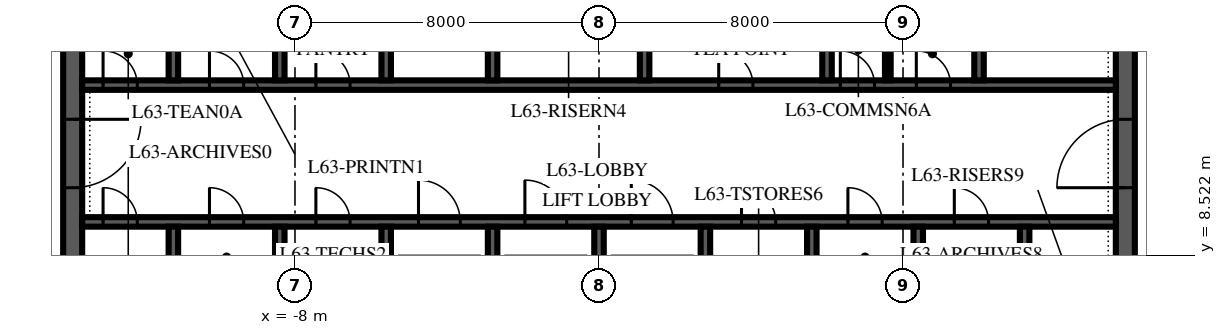
"""IFC4 building model, lengths in metres.
Left out: names, types, materials, properties, quantities, classifications, styles, units other than length and angle.
Written with IfcOpenShell. Run it as: python <this file> out.ifc"""

import sys

from ifc_helpers import new_model, si_unit, direction, frame, frame_2d, origin, place, context, subcontext, project, spatial, polyline, rectangle, outline, extrude, element, fill, save


model = new_model("IFC4")
c1 = context("Model", 3, precision=1e-05, world=origin(), true_north=direction((0.0, 1.0)))
c2 = subcontext(c1, "Body", "Model", "MODEL_VIEW")
j1 = project(units=[si_unit("LENGTHUNIT", "METRE"), si_unit("PLANEANGLEUNIT", "RADIAN")], contexts=[c1])
p1 = place(None, origin())
s1 = spatial("IfcSite", under=j1, at=p1, CompositionType="ELEMENT")
p2 = place(p1, origin())
s2 = spatial("IfcBuilding", under=s1, at=p2, CompositionType="ELEMENT")
p3 = place(p2, frame((0.0, 0.0, 272.0)))
s3 = spatial("IfcBuildingStorey", under=s2, at=p3, CompositionType="ELEMENT", Elevation=272.0)
p4 = place(p3, frame((13.85, 6.15, 0.0), z_axis=(0.0, 0.0, 1.0), x_axis=(0.0, 1.0, 0.0)))
e1 = element("IfcWall", 1, at=p4, inside=s3, PredefinedType="SHEAR", context=c2, shape_type="SweptSolid", body=[
    extrude(outline(polyline([(0.0, -0.25), (17.7, -0.25), (17.7, 0.0), (17.45, 0.0), (17.45, 0.25), (0.25, 0.25), (0.25, 0.0), (0.0, 0.0), (0.0, -0.25)])), origin(), (0.0, 0.0, 1.0), 4.0),
])
p5 = place(p4, frame((4.15, 0.0, 0.0)))
e2 = element("IfcOpeningElement", 2, at=p5, cuts=e1, PredefinedType="OPENING", context=c2, shape_type="SweptSolid", body=[
    extrude(rectangle(XDim=1.8, YDim=2.4, at=frame_2d((0.9, 1.2))), frame((0.0, 0.265, 0.0), z_axis=(0.0, -1.0, 0.0), x_axis=(1.0, 0.0, 0.0)), (0.0, 0.0, 1.0), 0.53),
])
p6 = place(p3, frame((-13.85, 23.85, 0.0), z_axis=(0.0, 0.0, 1.0), x_axis=(0.0, -1.0, 0.0)))
e3 = element("IfcWall", 3, at=p6, inside=s3, PredefinedType="SHEAR", context=c2, shape_type="SweptSolid", body=[
    extrude(outline(polyline([(0.0, -0.25), (17.7, -0.25), (17.7, 0.0), (17.45, 0.0), (17.45, 0.25), (0.25, 0.25), (0.25, 0.0), (0.0, 0.0), (0.0, -0.25)])), origin(), (0.0, 0.0, 1.0), 4.0),
])
p7 = place(p6, frame((11.75, 0.0, 0.0)))
e4 = element("IfcOpeningElement", 4, at=p7, cuts=e3, PredefinedType="OPENING", context=c2, shape_type="SweptSolid", body=[
    extrude(rectangle(XDim=1.8, YDim=2.4, at=frame_2d((0.9, 1.2))), frame((0.0, 0.265, 0.0), z_axis=(0.0, -1.0, 0.0), x_axis=(1.0, 0.0, 0.0)), (0.0, 0.0, 1.0), 0.53),
])
p8 = place(p3, frame((-13.6, 9.4, 0.0), z_axis=(0.0, 0.0, 1.0), x_axis=(1.0, 0.0, 0.0)))
e5 = element("IfcWall", 5, at=p8, inside=s3, PredefinedType="SHEAR", context=c2, shape_type="SweptSolid", body=[
    extrude(rectangle(XDim=27.2, YDim=0.25, at=frame_2d((13.6, 0.0))), origin(), (0.0, 0.0, 1.0), 4.0),
])
p9 = place(p8, frame((8.85, 0.0, 0.0)))
e6 = element("IfcOpeningElement", 6, at=p9, cuts=e5, PredefinedType="OPENING", context=c2, shape_type="SweptSolid", body=[
    extrude(rectangle(XDim=1.1, YDim=2.1, at=frame_2d((0.55, 1.05))), frame((0.0, 0.14, 0.0), z_axis=(0.0, -1.0, 0.0), x_axis=(1.0, 0.0, 0.0)), (0.0, 0.0, 1.0), 0.28),
])
p10 = place(p8, frame((11.65, 0.0, 0.0)))
e7 = element("IfcOpeningElement", 7, at=p10, cuts=e5, PredefinedType="OPENING", context=c2, shape_type="SweptSolid", body=[
    extrude(rectangle(XDim=1.1, YDim=2.1, at=frame_2d((0.55, 1.05))), frame((0.0, 0.14, 0.0), z_axis=(0.0, -1.0, 0.0), x_axis=(1.0, 0.0, 0.0)), (0.0, 0.0, 1.0), 0.28),
])
p11 = place(p8, frame((14.45, 0.0, 0.0)))
e8 = element("IfcOpeningElement", 8, at=p11, cuts=e5, PredefinedType="OPENING", context=c2, shape_type="SweptSolid", body=[
    extrude(rectangle(XDim=1.1, YDim=2.1, at=frame_2d((0.55, 1.05))), frame((0.0, 0.14, 0.0), z_axis=(0.0, -1.0, 0.0), x_axis=(1.0, 0.0, 0.0)), (0.0, 0.0, 1.0), 0.28),
])
p12 = place(p8, frame((0.55, 0.0, 0.0)))
e9 = element("IfcOpeningElement", 9, at=p12, cuts=e5, PredefinedType="OPENING", context=c2, shape_type="SweptSolid", body=[
    extrude(rectangle(XDim=0.9, YDim=2.1, at=frame_2d((0.45, 1.05))), frame((0.0, 0.14, 0.0), z_axis=(0.0, -1.0, 0.0), x_axis=(1.0, 0.0, 0.0)), (0.0, 0.0, 1.0), 0.28),
])
p13 = place(p8, frame((3.35, 0.0, 0.0)))
e10 = element("IfcOpeningElement", 10, at=p13, cuts=e5, PredefinedType="OPENING", context=c2, shape_type="SweptSolid", body=[
    extrude(rectangle(XDim=0.9, YDim=2.1, at=frame_2d((0.45, 1.05))), frame((0.0, 0.14, 0.0), z_axis=(0.0, -1.0, 0.0), x_axis=(1.0, 0.0, 0.0)), (0.0, 0.0, 1.0), 0.28),
])
p14 = place(p8, frame((6.15, 0.0, 0.0)))
e11 = element("IfcOpeningElement", 11, at=p14, cuts=e5, PredefinedType="OPENING", context=c2, shape_type="SweptSolid", body=[
    extrude(rectangle(XDim=0.9, YDim=2.1, at=frame_2d((0.45, 1.05))), frame((0.0, 0.14, 0.0), z_axis=(0.0, -1.0, 0.0), x_axis=(1.0, 0.0, 0.0)), (0.0, 0.0, 1.0), 0.28),
])
p15 = place(p8, frame((17.35, 0.0, 0.0)))
e12 = element("IfcOpeningElement", 12, at=p15, cuts=e5, PredefinedType="OPENING", context=c2, shape_type="SweptSolid", body=[
    extrude(rectangle(XDim=0.9, YDim=2.1, at=frame_2d((0.45, 1.05))), frame((0.0, 0.14, 0.0), z_axis=(0.0, -1.0, 0.0), x_axis=(1.0, 0.0, 0.0)), (0.0, 0.0, 1.0), 0.28),
])
p16 = place(p8, frame((20.15, 0.0, 0.0)))
e13 = element("IfcOpeningElement", 13, at=p16, cuts=e5, PredefinedType="OPENING", context=c2, shape_type="SweptSolid", body=[
    extrude(rectangle(XDim=0.9, YDim=2.1, at=frame_2d((0.45, 1.05))), frame((0.0, 0.14, 0.0), z_axis=(0.0, -1.0, 0.0), x_axis=(1.0, 0.0, 0.0)), (0.0, 0.0, 1.0), 0.28),
])
p17 = place(p8, frame((22.95, 0.0, 0.0)))
e14 = element("IfcOpeningElement", 14, at=p17, cuts=e5, PredefinedType="OPENING", context=c2, shape_type="SweptSolid", body=[
    extrude(rectangle(XDim=0.9, YDim=2.1, at=frame_2d((0.45, 1.05))), frame((0.0, 0.14, 0.0), z_axis=(0.0, -1.0, 0.0), x_axis=(1.0, 0.0, 0.0)), (0.0, 0.0, 1.0), 0.28),
])
p18 = place(p3, frame((-13.6, 13.0, 0.0), z_axis=(0.0, 0.0, 1.0), x_axis=(1.0, 0.0, 0.0)))
e15 = element("IfcWall", 15, at=p18, inside=s3, PredefinedType="SHEAR", context=c2, shape_type="SweptSolid", body=[
    extrude(rectangle(XDim=27.2, YDim=0.25, at=frame_2d((13.6, 0.0))), origin(), (0.0, 0.0, 1.0), 4.0),
])
p19 = place(p18, frame((16.75, 0.0, 0.0)))
e16 = element("IfcOpeningElement", 16, at=p19, cuts=e15, PredefinedType="OPENING", context=c2, shape_type="SweptSolid", body=[
    extrude(rectangle(XDim=0.9, YDim=2.1, at=frame_2d((0.45, 1.05))), frame((0.0, 0.14, 0.0), z_axis=(0.0, -1.0, 0.0), x_axis=(1.0, 0.0, 0.0)), (0.0, 0.0, 1.0), 0.28),
])
p20 = place(p18, frame((19.95, 0.0, 0.0)))
e17 = element("IfcOpeningElement", 17, at=p20, cuts=e15, PredefinedType="OPENING", context=c2, shape_type="SweptSolid", body=[
    extrude(rectangle(XDim=0.9, YDim=2.1, at=frame_2d((0.45, 1.05))), frame((0.0, 0.14, 0.0), z_axis=(0.0, -1.0, 0.0), x_axis=(1.0, 0.0, 0.0)), (0.0, 0.0, 1.0), 0.28),
])
p21 = place(p18, frame((21.95, 0.0, 0.0)))
e18 = element("IfcOpeningElement", 18, at=p21, cuts=e15, PredefinedType="OPENING", context=c2, shape_type="SweptSolid", body=[
    extrude(rectangle(XDim=0.9, YDim=2.1, at=frame_2d((0.45, 1.05))), frame((0.0, 0.14, 0.0), z_axis=(0.0, -1.0, 0.0), x_axis=(1.0, 0.0, 0.0)), (0.0, 0.0, 1.0), 0.28),
])
p22 = place(p18, frame((0.55, 0.0, 0.0)))
e19 = element("IfcOpeningElement", 19, at=p22, cuts=e15, PredefinedType="OPENING", context=c2, shape_type="SweptSolid", body=[
    extrude(rectangle(XDim=0.9, YDim=2.1, at=frame_2d((0.45, 1.05))), frame((0.0, 0.14, 0.0), z_axis=(0.0, -1.0, 0.0), x_axis=(1.0, 0.0, 0.0)), (0.0, 0.0, 1.0), 0.28),
])
p23 = place(p18, frame((3.35, 0.0, 0.0)))
e20 = element("IfcOpeningElement", 20, at=p23, cuts=e15, PredefinedType="OPENING", context=c2, shape_type="SweptSolid", body=[
    extrude(rectangle(XDim=0.9, YDim=2.1, at=frame_2d((0.45, 1.05))), frame((0.0, 0.14, 0.0), z_axis=(0.0, -1.0, 0.0), x_axis=(1.0, 0.0, 0.0)), (0.0, 0.0, 1.0), 0.28),
])
p24 = place(p18, frame((6.15, 0.0, 0.0)))
e21 = element("IfcOpeningElement", 21, at=p24, cuts=e15, PredefinedType="OPENING", context=c2, shape_type="SweptSolid", body=[
    extrude(rectangle(XDim=0.9, YDim=2.1, at=frame_2d((0.45, 1.05))), frame((0.0, 0.14, 0.0), z_axis=(0.0, -1.0, 0.0), x_axis=(1.0, 0.0, 0.0)), (0.0, 0.0, 1.0), 0.28),
])
for number, where, z_axis, x_axis in (
    (22, (-11.2, 6.4, 0.0), (0.0, 0.0, 1.0), (0.0, 1.0, 0.0)),
    (23, (-8.4, 6.4, 0.0), (0.0, 0.0, 1.0), (0.0, 1.0, 0.0)),
    (24, (-5.6, 6.4, 0.0), (0.0, 0.0, 1.0), (0.0, 1.0, 0.0)),
    (25, (-2.8, 6.4, 0.0), (0.0, 0.0, 1.0), (0.0, 1.0, 0.0)),
    (26, (0.0, 6.4, 0.0), (0.0, 0.0, 1.0), (0.0, 1.0, 0.0)),
    (27, (2.8, 6.4, 0.0), (0.0, 0.0, 1.0), (0.0, 1.0, 0.0)),
    (28, (5.6, 6.4, 0.0), (0.0, 0.0, 1.0), (0.0, 1.0, 0.0)),
    (29, (8.4, 6.4, 0.0), (0.0, 0.0, 1.0), (0.0, 1.0, 0.0)),
    (30, (11.2, 6.4, 0.0), (0.0, 0.0, 1.0), (0.0, 1.0, 0.0)),
):
    element("IfcWall", number, at=place(p3, frame(where, z_axis=z_axis, x_axis=x_axis)), inside=s3, PredefinedType="SHEAR", context=c2, shape_type="SweptSolid", body=[
        extrude(rectangle(XDim=2.875, YDim=0.25, at=frame_2d((1.438, 0.0))), origin(), (0.0, 0.0, 1.0), 4.0),
    ])
for number, where, z_axis, x_axis in (
    (31, (-11.2, 13.125, 0.0), (0.0, 0.0, 1.0), (0.0, 1.0, 0.0)),
    (32, (-8.4, 13.125, 0.0), (0.0, 0.0, 1.0), (0.0, 1.0, 0.0)),
    (33, (-5.6, 13.125, 0.0), (0.0, 0.0, 1.0), (0.0, 1.0, 0.0)),
    (34, (-2.8, 13.125, 0.0), (0.0, 0.0, 1.0), (0.0, 1.0, 0.0)),
    (35, (1.2, 13.125, 0.0), (0.0, 0.0, 1.0), (0.0, 1.0, 0.0)),
    (36, (6.0, 13.125, 0.0), (0.0, 0.0, 1.0), (0.0, 1.0, 0.0)),
    (37, (10.0, 13.125, 0.0), (0.0, 0.0, 1.0), (0.0, 1.0, 0.0)),
):
    element("IfcWall", number, at=place(p3, frame(where, z_axis=z_axis, x_axis=x_axis)), inside=s3, PredefinedType="SHEAR", context=c2, shape_type="SweptSolid", body=[
        extrude(rectangle(XDim=2.75, YDim=0.25, at=frame_2d((1.375, 0.0))), origin(), (0.0, 0.0, 1.0), 4.0),
    ])
p25 = place(p3, frame((7.6, 13.125, 0.0), z_axis=(0.0, 0.0, 1.0), x_axis=(0.0, 1.0, 0.0)))
e38 = element("IfcWall", 38, at=p25, inside=s3, PredefinedType="PARTITIONING", context=c2, shape_type="SweptSolid", body=[
    extrude(rectangle(XDim=1.55, YDim=0.15, at=frame_2d((0.775, 0.0))), origin(), (0.0, 0.0, 1.0), 3.85),
])
p26 = place(p5, origin())
e39 = element("IfcDoor", 39, at=p26, inside=s3, OperationType="DOUBLE_DOOR_SINGLE_SWING", PredefinedType="DOOR", context=c2, shape_type="SweptSolid", body=[
    extrude(rectangle(XDim=1.8, YDim=2.4, at=frame_2d((0.9, 1.2))), frame((0.0, 0.25, 0.0), z_axis=(0.0, -1.0, 0.0), x_axis=(1.0, 0.0, 0.0)), (0.0, 0.0, 1.0), 0.5),
])
fill(e2, e39)
p27 = place(p7, origin())
e40 = element("IfcDoor", 40, at=p27, inside=s3, OperationType="DOUBLE_DOOR_SINGLE_SWING", PredefinedType="DOOR", context=c2, shape_type="SweptSolid", body=[
    extrude(rectangle(XDim=1.8, YDim=2.4, at=frame_2d((0.9, 1.2))), frame((0.0, 0.25, 0.0), z_axis=(0.0, -1.0, 0.0), x_axis=(1.0, 0.0, 0.0)), (0.0, 0.0, 1.0), 0.5),
])
fill(e4, e40)
p28 = place(p9, origin())
e41 = element("IfcDoor", 41, at=p28, inside=s3, OperationType="SLIDING_TO_LEFT", PredefinedType="DOOR", context=c2, shape_type="SweptSolid", body=[
    extrude(rectangle(XDim=1.1, YDim=2.1, at=frame_2d((0.55, 1.05))), frame((0.0, 0.125, 0.0), z_axis=(0.0, -1.0, 0.0), x_axis=(1.0, 0.0, 0.0)), (0.0, 0.0, 1.0), 0.25),
])
fill(e6, e41)
p29 = place(p10, origin())
e42 = element("IfcDoor", 42, at=p29, inside=s3, OperationType="SLIDING_TO_LEFT", PredefinedType="DOOR", context=c2, shape_type="SweptSolid", body=[
    extrude(rectangle(XDim=1.1, YDim=2.1, at=frame_2d((0.55, 1.05))), frame((0.0, 0.125, 0.0), z_axis=(0.0, -1.0, 0.0), x_axis=(1.0, 0.0, 0.0)), (0.0, 0.0, 1.0), 0.25),
])
fill(e7, e42)
p30 = place(p11, origin())
e43 = element("IfcDoor", 43, at=p30, inside=s3, OperationType="SLIDING_TO_LEFT", PredefinedType="DOOR", context=c2, shape_type="SweptSolid", body=[
    extrude(rectangle(XDim=1.1, YDim=2.1, at=frame_2d((0.55, 1.05))), frame((0.0, 0.125, 0.0), z_axis=(0.0, -1.0, 0.0), x_axis=(1.0, 0.0, 0.0)), (0.0, 0.0, 1.0), 0.25),
])
fill(e8, e43)
p31 = place(p19, origin())
e44 = element("IfcDoor", 44, at=p31, inside=s3, OperationType="SINGLE_SWING_LEFT", PredefinedType="DOOR", context=c2, shape_type="SweptSolid", body=[
    extrude(rectangle(XDim=0.9, YDim=2.1, at=frame_2d((0.45, 1.05))), frame((0.0, 0.125, 0.0), z_axis=(0.0, -1.0, 0.0), x_axis=(1.0, 0.0, 0.0)), (0.0, 0.0, 1.0), 0.25),
])
fill(e16, e44)
p32 = place(p20, origin())
e45 = element("IfcDoor", 45, at=p32, inside=s3, OperationType="SINGLE_SWING_LEFT", PredefinedType="DOOR", context=c2, shape_type="SweptSolid", body=[
    extrude(rectangle(XDim=0.9, YDim=2.1, at=frame_2d((0.45, 1.05))), frame((0.0, 0.125, 0.0), z_axis=(0.0, -1.0, 0.0), x_axis=(1.0, 0.0, 0.0)), (0.0, 0.0, 1.0), 0.25),
])
fill(e17, e45)
p33 = place(p21, origin())
e46 = element("IfcDoor", 46, at=p33, inside=s3, OperationType="SINGLE_SWING_LEFT", PredefinedType="DOOR", context=c2, shape_type="SweptSolid", body=[
    extrude(rectangle(XDim=0.9, YDim=2.1, at=frame_2d((0.45, 1.05))), frame((0.0, 0.125, 0.0), z_axis=(0.0, -1.0, 0.0), x_axis=(1.0, 0.0, 0.0)), (0.0, 0.0, 1.0), 0.25),
])
fill(e18, e46)
p34 = place(p22, origin())
e47 = element("IfcDoor", 47, at=p34, inside=s3, OperationType="SINGLE_SWING_LEFT", PredefinedType="DOOR", context=c2, shape_type="SweptSolid", body=[
    extrude(rectangle(XDim=0.9, YDim=2.1, at=frame_2d((0.45, 1.05))), frame((0.0, 0.125, 0.0), z_axis=(0.0, -1.0, 0.0), x_axis=(1.0, 0.0, 0.0)), (0.0, 0.0, 1.0), 0.25),
])
fill(e19, e47)
p35 = place(p23, origin())
e48 = element("IfcDoor", 48, at=p35, inside=s3, OperationType="SINGLE_SWING_LEFT", PredefinedType="DOOR", context=c2, shape_type="SweptSolid", body=[
    extrude(rectangle(XDim=0.9, YDim=2.1, at=frame_2d((0.45, 1.05))), frame((0.0, 0.125, 0.0), z_axis=(0.0, -1.0, 0.0), x_axis=(1.0, 0.0, 0.0)), (0.0, 0.0, 1.0), 0.25),
])
fill(e20, e48)
p36 = place(p24, origin())
e49 = element("IfcDoor", 49, at=p36, inside=s3, OperationType="SINGLE_SWING_LEFT", PredefinedType="DOOR", context=c2, shape_type="SweptSolid", body=[
    extrude(rectangle(XDim=0.9, YDim=2.1, at=frame_2d((0.45, 1.05))), frame((0.0, 0.125, 0.0), z_axis=(0.0, -1.0, 0.0), x_axis=(1.0, 0.0, 0.0)), (0.0, 0.0, 1.0), 0.25),
])
fill(e21, e49)
p37 = place(p12, origin())
e50 = element("IfcDoor", 50, at=p37, inside=s3, OperationType="SINGLE_SWING_LEFT", PredefinedType="DOOR", context=c2, shape_type="SweptSolid", body=[
    extrude(rectangle(XDim=0.9, YDim=2.1, at=frame_2d((0.45, 1.05))), frame((0.0, 0.125, 0.0), z_axis=(0.0, -1.0, 0.0), x_axis=(1.0, 0.0, 0.0)), (0.0, 0.0, 1.0), 0.25),
])
fill(e9, e50)
p38 = place(p13, origin())
e51 = element("IfcDoor", 51, at=p38, inside=s3, OperationType="SINGLE_SWING_LEFT", PredefinedType="DOOR", context=c2, shape_type="SweptSolid", body=[
    extrude(rectangle(XDim=0.9, YDim=2.1, at=frame_2d((0.45, 1.05))), frame((0.0, 0.125, 0.0), z_axis=(0.0, -1.0, 0.0), x_axis=(1.0, 0.0, 0.0)), (0.0, 0.0, 1.0), 0.25),
])
fill(e10, e51)
p39 = place(p14, origin())
e52 = element("IfcDoor", 52, at=p39, inside=s3, OperationType="SINGLE_SWING_LEFT", PredefinedType="DOOR", context=c2, shape_type="SweptSolid", body=[
    extrude(rectangle(XDim=0.9, YDim=2.1, at=frame_2d((0.45, 1.05))), frame((0.0, 0.125, 0.0), z_axis=(0.0, -1.0, 0.0), x_axis=(1.0, 0.0, 0.0)), (0.0, 0.0, 1.0), 0.25),
])
fill(e11, e52)
p40 = place(p15, origin())
e53 = element("IfcDoor", 53, at=p40, inside=s3, OperationType="SINGLE_SWING_LEFT", PredefinedType="DOOR", context=c2, shape_type="SweptSolid", body=[
    extrude(rectangle(XDim=0.9, YDim=2.1, at=frame_2d((0.45, 1.05))), frame((0.0, 0.125, 0.0), z_axis=(0.0, -1.0, 0.0), x_axis=(1.0, 0.0, 0.0)), (0.0, 0.0, 1.0), 0.25),
])
fill(e12, e53)
p41 = place(p16, origin())
e54 = element("IfcDoor", 54, at=p41, inside=s3, OperationType="SINGLE_SWING_LEFT", PredefinedType="DOOR", context=c2, shape_type="SweptSolid", body=[
    extrude(rectangle(XDim=0.9, YDim=2.1, at=frame_2d((0.45, 1.05))), frame((0.0, 0.125, 0.0), z_axis=(0.0, -1.0, 0.0), x_axis=(1.0, 0.0, 0.0)), (0.0, 0.0, 1.0), 0.25),
])
fill(e13, e54)
p42 = place(p17, origin())
e55 = element("IfcDoor", 55, at=p42, inside=s3, OperationType="SINGLE_SWING_LEFT", PredefinedType="DOOR", context=c2, shape_type="SweptSolid", body=[
    extrude(rectangle(XDim=0.9, YDim=2.1, at=frame_2d((0.45, 1.05))), frame((0.0, 0.125, 0.0), z_axis=(0.0, -1.0, 0.0), x_axis=(1.0, 0.0, 0.0)), (0.0, 0.0, 1.0), 0.25),
])
fill(e14, e55)
save(model, sys.argv[1])
